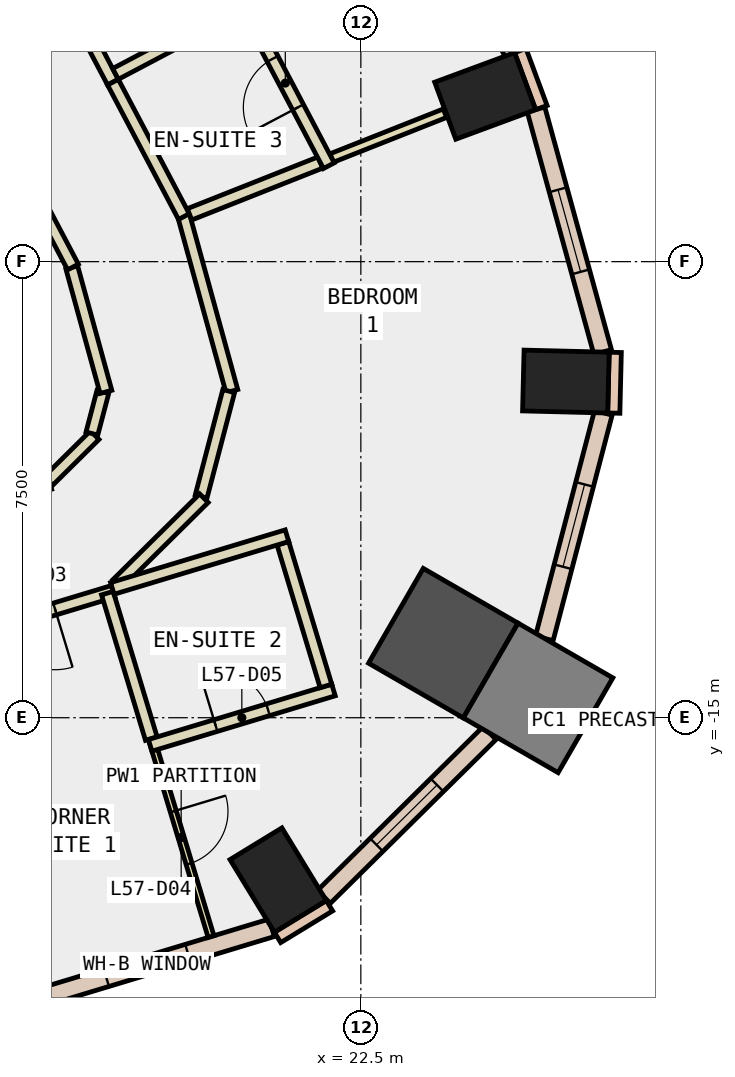
"""IFC4 building model, lengths in metres.
Left out: names, types, materials, properties, quantities, classifications, styles, units other than length and angle.
Written with IfcOpenShell. Run it as: python <this file> out.ifc"""

import sys

from ifc_helpers import new_model, si_unit, direction, frame, frame_2d, origin, origin_2d, place, context, subcontext, project, spatial, rectangle, extrude, element, fill, save


model = new_model("IFC4")
c1 = context("Model", 3, precision=1e-05, world=origin(), true_north=direction((0.0, 1.0)))
c2 = subcontext(c1, "Body", "Model", "MODEL_VIEW")
j1 = project(units=[si_unit("LENGTHUNIT", "METRE"), si_unit("PLANEANGLEUNIT", "RADIAN")], contexts=[c1])
p1 = place(None, origin())
s1 = spatial("IfcSite", under=j1, at=p1, CompositionType="ELEMENT")
p2 = place(p1, origin())
s2 = spatial("IfcBuilding", under=s1, at=p2, CompositionType="ELEMENT")
p3 = place(p2, frame((0.0, 0.0, 252.2)))
s3 = spatial("IfcBuildingStorey", under=s2, at=p3, CompositionType="ELEMENT", Elevation=252.2)
p4 = place(p3, frame((21.14, -17.67, -0.34), z_axis=(0.0, 0.0, 1.0), x_axis=(0.853341581839, 0.521352227103, 0.0)))
e1 = element("IfcColumn", 1, at=p4, inside=s3, PredefinedType="COLUMN", context=c2, shape_type="SweptSolid", body=[
    extrude(rectangle(XDim=1.0, YDim=1.4, at=origin_2d()), origin(), (0.0, 0.0, 1.0), 3.6),
])
p5 = place(p3, frame((23.856, -13.774, -0.34), z_axis=(0.0, 0.0, 1.0), x_axis=(-0.866025403784, 0.5, 0.0)))
e2 = element("IfcColumn", 2, at=p5, inside=s3, PredefinedType="COLUMN", context=c2, shape_type="SweptSolid", body=[
    extrude(rectangle(XDim=1.8, YDim=1.8, at=origin_2d()), origin(), (0.0, 0.0, 1.0), 3.6),
])
for number, where, z_axis, x_axis in (
    (3, (25.872, -9.472, -0.34), (0.0, 0.0, 1.0), (0.025, 1.0, 0.0)),
    (4, (24.545, -4.775, -0.34), (0.0, 0.0, 1.0), (-0.347, 0.938, 0.0)),
):
    element("IfcColumn", number, at=place(p3, frame(where, z_axis=z_axis, x_axis=x_axis)), inside=s3, PredefinedType="COLUMN", context=c2, shape_type="SweptSolid", body=[
        extrude(rectangle(XDim=1.0, YDim=1.4, at=origin_2d()), origin(), (0.0, 0.0, 1.0), 3.6),
    ])
p6 = place(p3, frame((25.415, -14.674, -0.34), z_axis=(0.0, 0.0, 1.0), x_axis=(-0.866025403784, 0.5, 0.0)))
e5 = element("IfcColumn", 5, at=p6, inside=s3, PredefinedType="COLUMN", context=c2, shape_type="SweptSolid", body=[
    extrude(rectangle(XDim=1.8, YDim=1.8, at=origin_2d()), origin(), (0.0, 0.0, 1.0), 3.6),
])
p7 = place(p3, frame((25.469, -4.967, 0.0), z_axis=(0.0, 0.0, 1.0), x_axis=(-0.346892928577, 0.937904737222, 0.0)))
e6 = element("IfcWall", 6, at=p7, inside=s3, PredefinedType="STANDARD", context=c2, shape_type="SweptSolid", body=[
    extrude(rectangle(XDim=1.0, YDim=0.2, at=frame_2d((0.5, 0.0))), origin(), (0.0, 0.0, 1.0), 3.26),
])
p8 = place(p3, frame((21.13, -18.613, 0.0), z_axis=(0.0, 0.0, 1.0), x_axis=(0.853679739553, 0.520798331677, 0.0)))
e7 = element("IfcWall", 7, at=p8, inside=s3, PredefinedType="STANDARD", context=c2, shape_type="SweptSolid", body=[
    extrude(rectangle(XDim=1.0, YDim=0.2, at=frame_2d((0.5, 0.0))), origin(), (0.0, 0.0, 1.0), 3.26),
])
p9 = place(p3, frame((26.66, -9.991, 0.0), z_axis=(0.0, 0.0, 1.0), x_axis=(0.024186470916, 0.999707464524, 0.0)))
e8 = element("IfcWall", 8, at=p9, inside=s3, PredefinedType="STANDARD", context=c2, shape_type="SweptSolid", body=[
    extrude(rectangle(XDim=0.999, YDim=0.2, at=frame_2d((0.5, 0.0))), origin(), (0.0, 0.0, 1.0), 3.26),
])
p10 = place(p3, frame((16.936, -19.692, 0.0), z_axis=(0.0, 0.0, 1.0), x_axis=(0.957346168713, 0.288943442997, 0.0)))
e9 = element("IfcWall", 9, at=p10, inside=s3, PredefinedType="STANDARD", context=c2, shape_type="SweptSolid", body=[
    extrude(rectangle(XDim=4.281, YDim=0.3, at=frame_2d((2.14, 0.0))), origin(), (0.0, 0.0, 1.0), 3.26),
])
p11 = place(p10, frame((1.44, 0.0, 0.9)))
e10 = element("IfcOpeningElement", 10, at=p11, cuts=e9, PredefinedType="OPENING", context=c2, shape_type="SweptSolid", body=[
    extrude(rectangle(XDim=1.4, YDim=2.0, at=frame_2d((0.7, 1.0))), frame((0.0, 0.16, 0.0), z_axis=(0.0, -1.0, 0.0), x_axis=(1.0, 0.0, 0.0)), (0.0, 0.0, 1.0), 0.32),
])
p12 = place(p3, frame((21.893, -17.946, 0.0), z_axis=(0.0, 0.0, 1.0), x_axis=(0.71110935557, 0.703081420904, 0.0)))
e11 = element("IfcWall", 11, at=p12, inside=s3, PredefinedType="STANDARD", context=c2, shape_type="SweptSolid", body=[
    extrude(rectangle(XDim=3.832, YDim=0.3, at=frame_2d((1.916, 0.0))), origin(), (0.0, 0.0, 1.0), 3.26),
])
p13 = place(p12, frame((1.216, 0.0, 0.9)))
e12 = element("IfcOpeningElement", 12, at=p13, cuts=e11, PredefinedType="OPENING", context=c2, shape_type="SweptSolid", body=[
    extrude(rectangle(XDim=1.4, YDim=2.0, at=frame_2d((0.7, 1.0))), frame((0.0, 0.16, 0.0), z_axis=(0.0, -1.0, 0.0), x_axis=(1.0, 0.0, 0.0)), (0.0, 0.0, 1.0), 0.32),
])
p14 = place(p3, frame((25.517, -13.695, 0.0), z_axis=(0.0, 0.0, 1.0), x_axis=(0.253248721632, 0.967401201669, 0.0)))
e13 = element("IfcWall", 13, at=p14, inside=s3, PredefinedType="STANDARD", context=c2, shape_type="SweptSolid", body=[
    extrude(rectangle(XDim=3.834, YDim=0.3, at=frame_2d((1.917, 0.0))), origin(), (0.0, 0.0, 1.0), 3.26),
])
p15 = place(p14, frame((1.217, 0.0, 0.9)))
e14 = element("IfcOpeningElement", 14, at=p15, cuts=e13, PredefinedType="OPENING", context=c2, shape_type="SweptSolid", body=[
    extrude(rectangle(XDim=1.4, YDim=2.0, at=frame_2d((0.7, 1.0))), frame((0.0, 0.16, 0.0), z_axis=(0.0, -1.0, 0.0), x_axis=(1.0, 0.0, 0.0)), (0.0, 0.0, 1.0), 0.32),
])
p16 = place(p3, frame((26.477, -8.987, 0.0), z_axis=(0.0, 0.0, 1.0), x_axis=(-0.264924661919, 0.964269113633, 0.0)))
e15 = element("IfcWall", 15, at=p16, inside=s3, PredefinedType="STANDARD", context=c2, shape_type="SweptSolid", body=[
    extrude(rectangle(XDim=4.137, YDim=0.3, at=frame_2d((2.068, 0.0))), origin(), (0.0, 0.0, 1.0), 3.26),
])
p17 = place(p16, frame((1.368, 0.0, 0.9)))
e16 = element("IfcOpeningElement", 16, at=p17, cuts=e15, PredefinedType="OPENING", context=c2, shape_type="SweptSolid", body=[
    extrude(rectangle(XDim=1.4, YDim=2.0, at=frame_2d((0.7, 1.0))), frame((0.0, 0.16, 0.0), z_axis=(0.0, -1.0, 0.0), x_axis=(1.0, 0.0, 0.0)), (0.0, 0.0, 1.0), 0.32),
])
p18 = place(p3, frame((25.012, -4.07, 0.0), z_axis=(0.0, 0.0, 1.0), x_axis=(-0.466663589714, 0.884434900959, 0.0)))
e17 = element("IfcWall", 17, at=p18, inside=s3, PredefinedType="STANDARD", context=c2, shape_type="SweptSolid", body=[
    extrude(rectangle(XDim=5.638, YDim=0.3, at=frame_2d((2.819, 0.0))), origin(), (0.0, 0.0, 1.0), 3.26),
])
p19 = place(p18, frame((0.459, 0.0, 0.9)))
e18 = element("IfcOpeningElement", 18, at=p19, cuts=e17, PredefinedType="OPENING", context=c2, shape_type="SweptSolid", body=[
    extrude(rectangle(XDim=1.9, YDim=2.0, at=frame_2d((0.95, 1.0))), frame((0.0, 0.16, 0.0), z_axis=(0.0, -1.0, 0.0), x_axis=(1.0, 0.0, 0.0)), (0.0, 0.0, 1.0), 0.32),
])
p20 = place(p18, frame((3.278, 0.0, 0.9)))
e19 = element("IfcOpeningElement", 19, at=p20, cuts=e17, PredefinedType="OPENING", context=c2, shape_type="SweptSolid", body=[
    extrude(rectangle(XDim=1.9, YDim=2.0, at=frame_2d((0.95, 1.0))), frame((0.0, 0.16, 0.0), z_axis=(0.0, -1.0, 0.0), x_axis=(1.0, 0.0, 0.0)), (0.0, 0.0, 1.0), 0.32),
])
p21 = place(p3, frame((17.362, -11.106, 0.0), z_axis=(0.0, 0.0, 1.0), x_axis=(0.710859741153, 0.703333795866, 0.0)))
e20 = element("IfcWall", 20, at=p21, inside=s3, PredefinedType="PARTITIONING", context=c2, shape_type="SweptSolid", body=[
    extrude(rectangle(XDim=1.071, YDim=0.2, at=frame_2d((0.535, 0.0))), origin(), (0.0, 0.0, 1.0), 3.26),
])
p22 = place(p3, frame((18.077, -10.326, 0.0), z_axis=(0.0, 0.0, 1.0), x_axis=(0.254782174857, 0.966998471237, 0.0)))
e21 = element("IfcWall", 21, at=p22, inside=s3, PredefinedType="PARTITIONING", context=c2, shape_type="SweptSolid", body=[
    extrude(rectangle(XDim=0.707, YDim=0.2, at=frame_2d((0.354, 0.0))), origin(), (0.0, 0.0, 1.0), 3.26),
])
p23 = place(p3, frame((18.308, -9.642, 0.0), z_axis=(0.0, 0.0, 1.0), x_axis=(-0.264859637197, 0.96428697626, 0.0)))
e22 = element("IfcWall", 22, at=p23, inside=s3, PredefinedType="PARTITIONING", context=c2, shape_type="SweptSolid", body=[
    extrude(rectangle(XDim=2.122, YDim=0.2, at=frame_2d((1.061, 0.0))), origin(), (0.0, 0.0, 1.0), 3.26),
])
p24 = place(p3, frame((17.766, -7.588, 0.0), z_axis=(0.0, 0.0, 1.0), x_axis=(-0.466727344864, 0.884401258228, 0.0)))
e23 = element("IfcWall", 23, at=p24, inside=s3, PredefinedType="PARTITIONING", context=c2, shape_type="SweptSolid", body=[
    extrude(rectangle(XDim=2.205, YDim=0.2, at=frame_2d((1.103, 0.0))), origin(), (0.0, 0.0, 1.0), 3.26),
])
p25 = place(p3, frame((18.427, -12.922, 0.0), z_axis=(0.0, 0.0, 1.0), x_axis=(-0.957336631432, -0.288975040651, 0.0)))
e24 = element("IfcWall", 24, at=p25, inside=s3, PredefinedType="PARTITIONING", context=c2, shape_type="SweptSolid", body=[
    extrude(rectangle(XDim=3.0, YDim=0.2, at=frame_2d((1.5, 0.0))), origin(), (0.0, 0.0, 1.0), 3.26),
])
p26 = place(p25, frame((1.0, 0.0, 0.0)))
e25 = element("IfcOpeningElement", 25, at=p26, cuts=e24, PredefinedType="OPENING", context=c2, shape_type="SweptSolid", body=[
    extrude(rectangle(XDim=1.0, YDim=2.1, at=frame_2d((0.5, 1.05))), frame((0.0, 0.11, 0.0), z_axis=(0.0, -1.0, 0.0), x_axis=(1.0, 0.0, 0.0)), (0.0, 0.0, 1.0), 0.22),
])
p27 = place(p3, frame((19.564, -6.662, 0.0), z_axis=(0.0, 0.0, 1.0), x_axis=(0.264876135597, -0.96428244451, 0.0)))
e26 = element("IfcWall", 26, at=p27, inside=s3, PredefinedType="PARTITIONING", context=c2, shape_type="SweptSolid", body=[
    extrude(rectangle(XDim=3.077, YDim=0.2, at=frame_2d((1.538, 0.0))), origin(), (0.0, 0.0, 1.0), 3.26),
])
p28 = place(p3, frame((20.327, -9.629, 0.0), z_axis=(0.0, 0.0, 1.0), x_axis=(-0.253192482031, -0.967415922467, 0.0)))
e27 = element("IfcWall", 27, at=p28, inside=s3, PredefinedType="PARTITIONING", context=c2, shape_type="SweptSolid", body=[
    extrude(rectangle(XDim=1.792, YDim=0.2, at=frame_2d((0.896, 0.0))), origin(), (0.0, 0.0, 1.0), 3.26),
])
p29 = place(p3, frame((19.919, -11.39, 0.0), z_axis=(0.0, 0.0, 1.0), x_axis=(-0.71104667794, -0.70314480855, 0.0)))
e28 = element("IfcWall", 28, at=p29, inside=s3, PredefinedType="PARTITIONING", context=c2, shape_type="SweptSolid", body=[
    extrude(rectangle(XDim=2.008, YDim=0.2, at=frame_2d((1.004, 0.0))), origin(), (0.0, 0.0, 1.0), 3.26),
])
p30 = place(p3, frame((16.778, -1.429, 0.0), z_axis=(0.0, 0.0, 1.0), x_axis=(0.466493865945, -0.884524433261, 0.0)))
e29 = element("IfcWall", 29, at=p30, inside=s3, PredefinedType="PARTITIONING", context=c2, shape_type="SweptSolid", body=[
    extrude(rectangle(XDim=3.526, YDim=0.2, at=frame_2d((1.763, 0.0))), origin(), (0.0, 0.0, 1.0), 3.26),
])
p31 = place(p30, frame((1.313, 0.0, 0.0)))
e30 = element("IfcOpeningElement", 30, at=p31, cuts=e29, PredefinedType="OPENING", context=c2, shape_type="SweptSolid", body=[
    extrude(rectangle(XDim=1.0, YDim=2.1, at=frame_2d((0.5, 1.05))), frame((0.0, 0.11, 0.0), z_axis=(0.0, -1.0, 0.0), x_axis=(1.0, 0.0, 0.0)), (0.0, 0.0, 1.0), 0.22),
])
p32 = place(p3, frame((18.423, -4.548, 0.0), z_axis=(0.0, 0.0, 1.0), x_axis=(0.466792565793, -0.884366835946, 0.0)))
e31 = element("IfcWall", 31, at=p32, inside=s3, PredefinedType="PARTITIONING", context=c2, shape_type="SweptSolid", body=[
    extrude(rectangle(XDim=2.5, YDim=0.2, at=frame_2d((1.25, 0.0))), origin(), (0.0, 0.0, 1.0), 3.26),
])
p33 = place(p3, frame((19.054, -15.344, 0.0), z_axis=(0.0, 0.0, 1.0), x_axis=(0.288803435252, -0.957388414274, 0.0)))
e32 = element("IfcWall", 32, at=p33, inside=s3, PredefinedType="PARTITIONING", context=c2, shape_type="SweptSolid", body=[
    extrude(rectangle(XDim=3.4, YDim=0.1, at=frame_2d((1.7, 0.0))), origin(), (0.0, 0.0, 1.0), 3.26),
])
p34 = place(p33, frame((1.25, 0.0, 0.0)))
e33 = element("IfcOpeningElement", 33, at=p34, cuts=e32, PredefinedType="OPENING", context=c2, shape_type="SweptSolid", body=[
    extrude(rectangle(XDim=0.9, YDim=2.1, at=frame_2d((0.45, 1.05))), frame((0.0, 0.06, 0.0), z_axis=(0.0, -1.0, 0.0), x_axis=(1.0, 0.0, 0.0)), (0.0, 0.0, 1.0), 0.12),
])
p35 = place(p3, frame((18.331, -12.951, 0.0), z_axis=(0.0, 0.0, 1.0), x_axis=(0.289175152117, -0.957276204341, 0.0)))
e34 = element("IfcWall", 34, at=p35, inside=s3, PredefinedType="PARTITIONING", context=c2, shape_type="SweptSolid", body=[
    extrude(rectangle(XDim=2.5, YDim=0.2, at=frame_2d((1.25, 0.0))), origin(), (0.0, 0.0, 1.0), 3.26),
])
p36 = place(p3, frame((19.035, -15.455, 0.0), z_axis=(0.0, 0.0, 1.0), x_axis=(0.957248369253, 0.28926728049, 0.0)))
e35 = element("IfcWall", 35, at=p36, inside=s3, PredefinedType="PARTITIONING", context=c2, shape_type="SweptSolid", body=[
    extrude(rectangle(XDim=3.15, YDim=0.2, at=frame_2d((1.575, 0.0))), origin(), (0.0, 0.0, 1.0), 3.26),
])
p37 = place(p36, frame((1.125, 0.0, 0.0)))
e36 = element("IfcOpeningElement", 36, at=p37, cuts=e35, PredefinedType="OPENING", context=c2, shape_type="SweptSolid", body=[
    extrude(rectangle(XDim=0.9, YDim=2.1, at=frame_2d((0.45, 1.05))), frame((0.0, 0.11, 0.0), z_axis=(0.0, -1.0, 0.0), x_axis=(1.0, 0.0, 0.0)), (0.0, 0.0, 1.0), 0.22),
])
p38 = place(p3, frame((21.926, -14.478, 0.0), z_axis=(0.0, 0.0, 1.0), x_axis=(-0.288928787246, 0.957350591947, 0.0)))
e37 = element("IfcWall", 37, at=p38, inside=s3, PredefinedType="PARTITIONING", context=c2, shape_type="SweptSolid", body=[
    extrude(rectangle(XDim=2.45, YDim=0.2, at=frame_2d((1.225, 0.0))), origin(), (0.0, 0.0, 1.0), 3.26),
])
p39 = place(p3, frame((21.285, -12.007, 0.0), z_axis=(0.0, 0.0, 1.0), x_axis=(-0.957329834998, -0.288997555392, 0.0)))
e38 = element("IfcWall", 38, at=p39, inside=s3, PredefinedType="PARTITIONING", context=c2, shape_type="SweptSolid", body=[
    extrude(rectangle(XDim=3.0, YDim=0.2, at=frame_2d((1.5, 0.0))), origin(), (0.0, 0.0, 1.0), 3.26),
])
p40 = place(p3, frame((22.02, -5.796, 0.0), z_axis=(0.0, 0.0, 1.0), x_axis=(0.929915172208, 0.367774078066, 0.0)))
e39 = element("IfcWall", 39, at=p40, inside=s3, PredefinedType="PARTITIONING", context=c2, shape_type="SweptSolid", body=[
    extrude(rectangle(XDim=2.003, YDim=0.15, at=frame_2d((1.002, 0.0))), origin(), (0.0, 0.0, 1.0), 3.26),
])
p41 = place(p3, frame((19.683, -6.722, 0.0), z_axis=(0.0, 0.0, 1.0), x_axis=(0.929744903847, 0.368204309821, 0.0)))
e40 = element("IfcWall", 40, at=p41, inside=s3, PredefinedType="PARTITIONING", context=c2, shape_type="SweptSolid", body=[
    extrude(rectangle(XDim=2.313, YDim=0.2, at=frame_2d((1.157, 0.0))), origin(), (0.0, 0.0, 1.0), 3.26),
])
p42 = place(p3, frame((21.974, -5.922, 0.0), z_axis=(0.0, 0.0, 1.0), x_axis=(-0.466401249432, 0.88457327256, 0.0)))
e41 = element("IfcWall", 41, at=p42, inside=s3, PredefinedType="PARTITIONING", context=c2, shape_type="SweptSolid", body=[
    extrude(rectangle(XDim=3.073, YDim=0.2, at=frame_2d((1.536, 0.0))), origin(), (0.0, 0.0, 1.0), 3.26),
])
p43 = place(p42, frame((1.086, 0.0, 0.0)))
e42 = element("IfcOpeningElement", 42, at=p43, cuts=e41, PredefinedType="OPENING", context=c2, shape_type="SweptSolid", body=[
    extrude(rectangle(XDim=0.9, YDim=2.1, at=frame_2d((0.45, 1.05))), frame((0.0, 0.11, 0.0), z_axis=(0.0, -1.0, 0.0), x_axis=(1.0, 0.0, 0.0)), (0.0, 0.0, 1.0), 0.22),
])
p44 = place(p3, frame((20.499, -3.339, 0.0), z_axis=(0.0, 0.0, 1.0), x_axis=(-0.884293452572, -0.466931568583, 0.0)))
e43 = element("IfcWall", 43, at=p44, inside=s3, PredefinedType="PARTITIONING", context=c2, shape_type="SweptSolid", body=[
    extrude(rectangle(XDim=2.3, YDim=0.2, at=frame_2d((1.15, 0.0))), origin(), (0.0, 0.0, 1.0), 3.26),
])
p45 = place(p11, origin())
e44 = element("IfcWindow", 44, at=p45, inside=s3, PartitioningType="SINGLE_PANEL", PredefinedType="WINDOW", context=c2, shape_type="SweptSolid", body=[
    extrude(rectangle(XDim=1.4, YDim=2.0, at=frame_2d((0.7, 1.0))), frame((0.0, 0.03, 0.0), z_axis=(0.0, -1.0, 0.0), x_axis=(1.0, 0.0, 0.0)), (0.0, 0.0, 1.0), 0.06),
])
fill(e10, e44)
p46 = place(p13, origin())
e45 = element("IfcWindow", 45, at=p46, inside=s3, PartitioningType="SINGLE_PANEL", PredefinedType="WINDOW", context=c2, shape_type="SweptSolid", body=[
    extrude(rectangle(XDim=1.4, YDim=2.0, at=frame_2d((0.7, 1.0))), frame((0.0, 0.03, 0.0), z_axis=(0.0, -1.0, 0.0), x_axis=(1.0, 0.0, 0.0)), (0.0, 0.0, 1.0), 0.06),
])
fill(e12, e45)
p47 = place(p15, origin())
e46 = element("IfcWindow", 46, at=p47, inside=s3, PartitioningType="SINGLE_PANEL", PredefinedType="WINDOW", context=c2, shape_type="SweptSolid", body=[
    extrude(rectangle(XDim=1.4, YDim=2.0, at=frame_2d((0.7, 1.0))), frame((0.0, 0.03, 0.0), z_axis=(0.0, -1.0, 0.0), x_axis=(1.0, 0.0, 0.0)), (0.0, 0.0, 1.0), 0.06),
])
fill(e14, e46)
p48 = place(p17, origin())
e47 = element("IfcWindow", 47, at=p48, inside=s3, PartitioningType="SINGLE_PANEL", PredefinedType="WINDOW", context=c2, shape_type="SweptSolid", body=[
    extrude(rectangle(XDim=1.4, YDim=2.0, at=frame_2d((0.7, 1.0))), frame((0.0, 0.03, 0.0), z_axis=(0.0, -1.0, 0.0), x_axis=(1.0, 0.0, 0.0)), (0.0, 0.0, 1.0), 0.06),
])
fill(e16, e47)
p49 = place(p26, origin())
e48 = element("IfcDoor", 48, at=p49, inside=s3, OperationType="SINGLE_SWING_LEFT", PredefinedType="DOOR", context=c2, shape_type="SweptSolid", body=[
    extrude(rectangle(XDim=1.0, YDim=2.1, at=frame_2d((0.5, 1.05))), frame((0.0, 0.025, 0.0), z_axis=(0.0, -1.0, 0.0), x_axis=(1.0, 0.0, 0.0)), (0.0, 0.0, 1.0), 0.05),
])
fill(e25, e48)
p50 = place(p34, origin())
e49 = element("IfcDoor", 49, at=p50, inside=s3, OperationType="SINGLE_SWING_RIGHT", PredefinedType="DOOR", context=c2, shape_type="SweptSolid", body=[
    extrude(rectangle(XDim=0.9, YDim=2.1, at=frame_2d((0.45, 1.05))), frame((0.0, 0.025, 0.0), z_axis=(0.0, -1.0, 0.0), x_axis=(1.0, 0.0, 0.0)), (0.0, 0.0, 1.0), 0.05),
])
fill(e33, e49)
p51 = place(p37, origin())
e50 = element("IfcDoor", 50, at=p51, inside=s3, OperationType="SINGLE_SWING_LEFT", PredefinedType="DOOR", context=c2, shape_type="SweptSolid", body=[
    extrude(rectangle(XDim=0.9, YDim=2.1, at=frame_2d((0.45, 1.05))), frame((0.0, 0.025, 0.0), z_axis=(0.0, -1.0, 0.0), x_axis=(1.0, 0.0, 0.0)), (0.0, 0.0, 1.0), 0.05),
])
fill(e36, e50)
p52 = place(p43, origin())
e51 = element("IfcDoor", 51, at=p52, inside=s3, OperationType="SINGLE_SWING_RIGHT", PredefinedType="DOOR", context=c2, shape_type="SweptSolid", body=[
    extrude(rectangle(XDim=0.9, YDim=2.1, at=frame_2d((0.45, 1.05))), frame((0.0, 0.025, 0.0), z_axis=(0.0, -1.0, 0.0), x_axis=(1.0, 0.0, 0.0)), (0.0, 0.0, 1.0), 0.05),
])
fill(e42, e51)
save(model, sys.argv[1])
